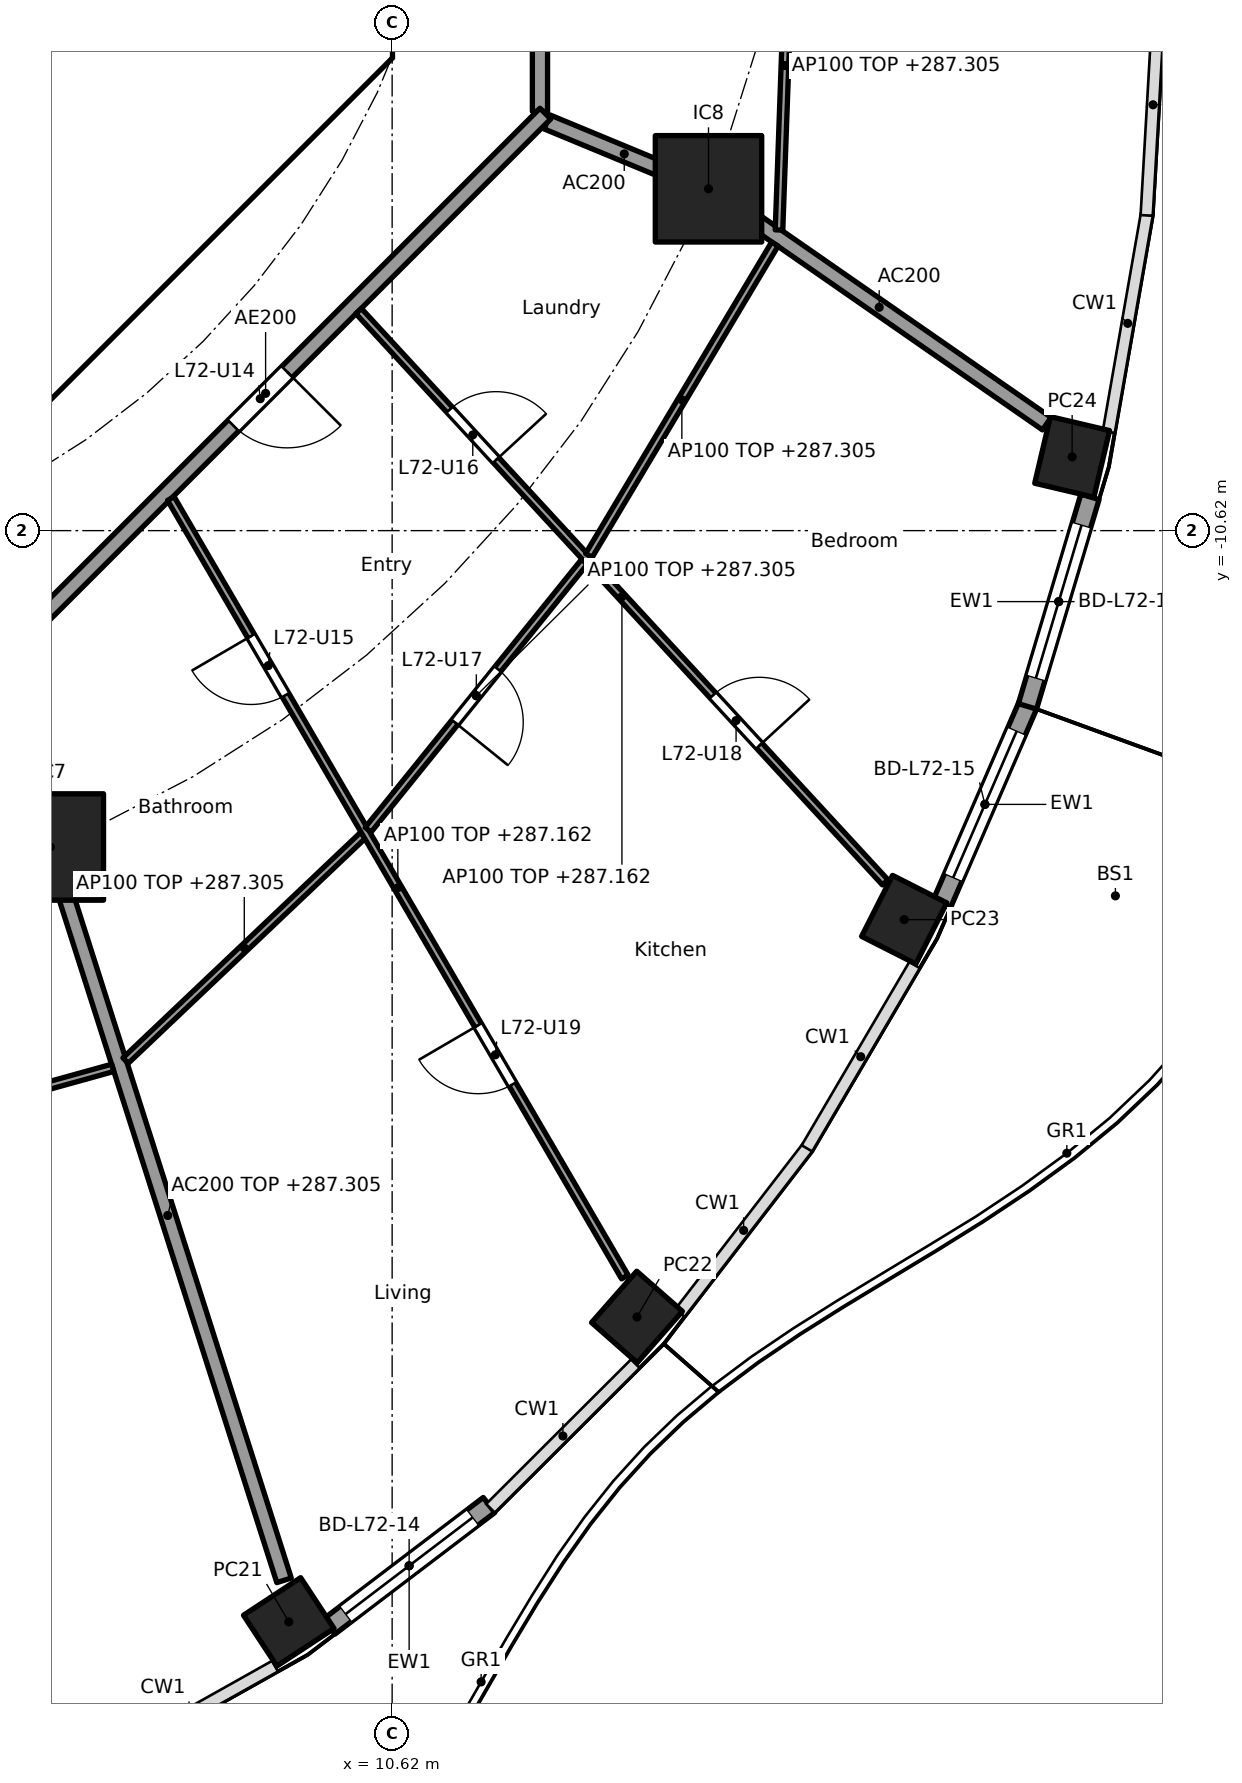
"""IFC4 building model, lengths in metres.
Left out: names, types, materials, properties, quantities, classifications, styles, units other than length and angle.
Written with IfcOpenShell. Run it as: python <this file> out.ifc"""

import sys

from ifc_helpers import new_model, si_unit, direction, frame, frame_2d, origin, origin_2d, place, context, subcontext, project, spatial, polyline, rectangle, hollow_rectangle, outline, extrude, element, fill, save


model = new_model("IFC4")
c1 = context("Model", 3, precision=1e-05, world=origin(), true_north=direction((0.0, 1.0)))
c2 = subcontext(c1, "Body", "Model", "MODEL_VIEW")
j1 = project(units=[si_unit("LENGTHUNIT", "METRE"), si_unit("PLANEANGLEUNIT", "RADIAN")], contexts=[c1])
p1 = place(None, origin())
s1 = spatial("IfcSite", under=j1, at=p1, CompositionType="ELEMENT")
p2 = place(p1, origin())
s2 = spatial("IfcBuilding", under=s1, at=p2, CompositionType="ELEMENT")
p3 = place(p2, frame((0.0, 0.0, 284.4)))
s3 = spatial("IfcBuildingStorey", under=s2, at=p3, CompositionType="ELEMENT", Elevation=284.4)
for number, where, z_axis, x_axis in (
    (1, (9.26, -24.976, 0.0), (0.0, 0.0, 1.0), (0.836, 0.549, 0.0)),
    (2, (13.841, -20.965, 0.0), (0.0, 0.0, 1.0), (0.66, 0.751, 0.0)),
    (3, (17.356, -15.738, 0.0), (0.0, 0.0, 1.0), (0.452, 0.892, 0.0)),
    (4, (19.566, -9.65, 0.0), (0.0, 0.0, 1.0), (0.229, 0.973, 0.0)),
):
    element("IfcColumn", number, at=place(p3, frame(where, z_axis=z_axis, x_axis=x_axis)), inside=s3, PredefinedType="COLUMN", context=c2, shape_type="SweptSolid", body=[
        extrude(hollow_rectangle(XDim=0.9, YDim=0.8, WallThickness=0.028, at=origin_2d()), origin(), (0.0, 0.0, 1.0), 3.7),
    ])
for number, where, z_axis, x_axis in (
    (5, (6.123, -14.782, 0.0), (0.0, 0.0, 1.0), (1.0, 0.0, 0.0)),
    (6, (14.782, -6.123, 0.0), (0.0, 0.0, 1.0), (1.0, 0.0, 0.0)),
):
    element("IfcColumn", number, at=place(p3, frame(where, z_axis=z_axis, x_axis=x_axis)), inside=s3, PredefinedType="COLUMN", context=c2, shape_type="SweptSolid", body=[
        extrude(rectangle(XDim=1.4, YDim=1.4, at=origin_2d()), origin(), (0.0, 0.0, 1.0), 3.7),
    ])
p4 = place(p3, frame((11.895, -23.439, 0.0), z_axis=(0.0, 0.0, 1.0), x_axis=(-0.796055284084, -0.605223912847, 0.0)))
e7 = element("IfcWall", 7, at=p4, inside=s3, PredefinedType="SOLIDWALL", context=c2, shape_type="SweptSolid", body=[
    extrude(rectangle(XDim=2.641, YDim=0.25, at=frame_2d((1.32, 0.0))), origin(), (0.0, 0.0, 1.0), 3.44),
])
p5 = place(p4, frame((0.27, 0.0, 0.0)))
e8 = element("IfcOpeningElement", 8, at=p5, cuts=e7, PredefinedType="OPENING", context=c2, shape_type="SweptSolid", body=[
    extrude(rectangle(XDim=2.1, YDim=2.4, at=frame_2d((1.05, 1.2))), frame((0.0, 0.135, 0.0), z_axis=(0.0, -1.0, 0.0), x_axis=(1.0, 0.0, 0.0)), (0.0, 0.0, 1.0), 0.27),
])
p6 = place(p3, frame((18.983, -12.918, 0.0), z_axis=(0.0, 0.0, 1.0), x_axis=(-0.397597791596, -0.9175598052, 0.0)))
e9 = element("IfcWall", 9, at=p6, inside=s3, PredefinedType="SOLIDWALL", context=c2, shape_type="SweptSolid", body=[
    extrude(rectangle(XDim=2.841, YDim=0.25, at=frame_2d((1.42, 0.0))), origin(), (0.0, 0.0, 1.0), 3.44),
])
p7 = place(p6, frame((0.371, 0.0, 0.0)))
e10 = element("IfcOpeningElement", 10, at=p7, cuts=e9, PredefinedType="OPENING", context=c2, shape_type="SweptSolid", body=[
    extrude(rectangle(XDim=2.1, YDim=2.4, at=frame_2d((1.05, 1.2))), frame((0.0, 0.135, 0.0), z_axis=(0.0, -1.0, 0.0), x_axis=(1.0, 0.0, 0.0)), (0.0, 0.0, 1.0), 0.27),
])
p8 = place(p3, frame((19.801, -10.175, 0.0), z_axis=(0.0, 0.0, 1.0), x_axis=(-0.285899456462, -0.958259620768, 0.0)))
e11 = element("IfcWall", 11, at=p8, inside=s3, PredefinedType="SOLIDWALL", context=c2, shape_type="SweptSolid", body=[
    extrude(rectangle(XDim=2.877, YDim=0.25, at=frame_2d((1.438, 0.0))), origin(), (0.0, 0.0, 1.0), 3.44),
])
p9 = place(p8, frame((0.389, 0.0, 0.0)))
e12 = element("IfcOpeningElement", 12, at=p9, cuts=e11, PredefinedType="OPENING", context=c2, shape_type="SweptSolid", body=[
    extrude(rectangle(XDim=2.1, YDim=2.4, at=frame_2d((1.05, 1.2))), frame((0.0, 0.135, 0.0), z_axis=(0.0, -1.0, 0.0), x_axis=(1.0, 0.0, 0.0)), (0.0, 0.0, 1.0), 0.27),
])
p10 = place(p3, frame((4.613, -9.988, 0.0), z_axis=(0.0, 0.0, 1.0), x_axis=(0.707106781187, 0.707106781187, 0.0)))
e13 = element("IfcWall", 13, at=p10, inside=s3, PredefinedType="SHEAR", context=c2, shape_type="SweptSolid", body=[
    extrude(rectangle(XDim=7.602, YDim=0.6, at=frame_2d((3.801, 0.0))), origin(), (0.0, 0.0, 1.0), 3.44),
])
p11 = place(p10, frame((3.201, 0.0, 0.0)))
e14 = element("IfcOpeningElement", 14, at=p11, cuts=e13, PredefinedType="OPENING", context=c2, shape_type="SweptSolid", body=[
    extrude(rectangle(XDim=1.2, YDim=2.1, at=frame_2d((0.6, 1.05))), frame((0.0, 0.31, 0.0), z_axis=(0.0, -1.0, 0.0), x_axis=(1.0, 0.0, 0.0)), (0.0, 0.0, 1.0), 0.62),
])
p12 = place(p3, origin())
e15 = element("IfcWall", 15, at=p12, inside=s3, PredefinedType="SHEAR", context=c2, shape_type="SweptSolid", body=[
    extrude(outline(polyline([(9.776, -4.401), (10.025, -4.152), (10.025, -3.801), (10.025, 4.152), (9.776, 4.401), (10.2, 4.825), (10.625, 4.401), (10.625, -4.401), (10.2, -4.825), (9.776, -4.401)])), origin(), (0.0, 0.0, 1.0), 3.44),
])
p13 = place(p3, frame((5.243, -12.657, 0.0), z_axis=(0.0, 0.0, 1.0), x_axis=(0.382707856524, -0.923869415315, 0.0)))
e16 = element("IfcWall", 16, at=p13, inside=s3, PredefinedType="PARTITIONING", context=c2, shape_type="SweptSolid", body=[
    extrude(rectangle(XDim=2.2, YDim=0.2, at=frame_2d((1.1, 0.0))), origin(), (0.0, 0.0, 1.0), 3.44),
])
p14 = place(p3, frame((6.138, -14.83, 0.0), z_axis=(0.0, 0.0, 1.0), x_axis=(0.303653679037, -0.952782474234, 0.0)))
e17 = element("IfcWall", 17, at=p14, inside=s3, PredefinedType="PARTITIONING", context=c2, shape_type="SweptSolid", body=[
    extrude(rectangle(XDim=10.076, YDim=0.2, at=frame_2d((5.038, 0.0))), origin(), (0.0, 0.0, 1.0), 2.905),
])
p15 = place(p3, frame((12.657, -5.243, 0.0), z_axis=(0.0, 0.0, 1.0), x_axis=(0.92383017907, -0.382802560388, 0.0)))
e18 = element("IfcWall", 18, at=p15, inside=s3, PredefinedType="PARTITIONING", context=c2, shape_type="SweptSolid", body=[
    extrude(rectangle(XDim=2.2, YDim=0.2, at=frame_2d((1.1, 0.0))), origin(), (0.0, 0.0, 1.0), 3.44),
])
p16 = place(p3, frame((14.823, -6.151, 0.0), z_axis=(0.0, 0.0, 1.0), x_axis=(0.821435065081, -0.570302054928, 0.0)))
e19 = element("IfcWall", 19, at=p16, inside=s3, PredefinedType="PARTITIONING", context=c2, shape_type="SweptSolid", body=[
    extrude(rectangle(XDim=5.368, YDim=0.2, at=frame_2d((2.684, 0.0))), origin(), (0.0, 0.0, 1.0), 3.44),
])
p17 = place(p3, frame((12.565, -5.104, 0.0), z_axis=(0.0, 0.0, 1.0), x_axis=(0.0, 1.0, 0.0)))
e20 = element("IfcWall", 20, at=p17, inside=s3, PredefinedType="PARTITIONING", context=c2, shape_type="SweptSolid", body=[
    extrude(rectangle(XDim=10.209, YDim=0.2, at=frame_2d((5.104, 0.0))), origin(), (0.0, 0.0, 1.0), 3.44),
])
p18 = place(p17, frame((4.604, 0.0, 0.0)))
e21 = element("IfcOpeningElement", 21, at=p18, cuts=e20, PredefinedType="OPENING", context=c2, shape_type="SweptSolid", body=[
    extrude(rectangle(XDim=1.0, YDim=2.1, at=frame_2d((0.5, 1.05))), frame((0.0, 0.11, 0.0), z_axis=(0.0, -1.0, 0.0), x_axis=(1.0, 0.0, 0.0)), (0.0, 0.0, 1.0), 0.22),
])
p19 = place(p3, frame((5.275, -12.494, 0.0), z_axis=(0.0, 0.0, 1.0), x_axis=(0.707106781187, 0.707106781187, 0.0)))
e22 = element("IfcWall", 22, at=p19, inside=s3, PredefinedType="PARTITIONING", context=c2, shape_type="SweptSolid", body=[
    extrude(rectangle(XDim=10.409, YDim=0.2, at=frame_2d((5.205, 0.0))), origin(), (0.0, 0.0, 1.0), 3.44),
])
p20 = place(p19, frame((4.604, 0.0, 0.0)))
e23 = element("IfcOpeningElement", 23, at=p20, cuts=e22, PredefinedType="OPENING", context=c2, shape_type="SweptSolid", body=[
    extrude(rectangle(XDim=1.0, YDim=2.1, at=frame_2d((0.5, 1.05))), frame((0.0, 0.11, 0.0), z_axis=(0.0, -1.0, 0.0), x_axis=(1.0, 0.0, 0.0)), (0.0, 0.0, 1.0), 0.22),
])
p21 = place(p3, frame((15.865, -2.338, 0.0), z_axis=(0.0, 0.0, 1.0), x_axis=(-0.035864509465, -0.999356661538, 0.0)))
e24 = element("IfcWall", 24, at=p21, inside=s3, PredefinedType="PARTITIONING", context=c2, shape_type="SweptSolid", body=[
    extrude(rectangle(XDim=4.329, YDim=0.1, at=frame_2d((2.165, 0.0))), origin(), (0.0, 0.0, 1.0), 2.905),
])
p22 = place(p3, frame((3.231, -18.718, 0.0), z_axis=(0.0, 0.0, 1.0), x_axis=(0.963606817151, 0.267323590318, 0.0)))
e25 = element("IfcWall", 25, at=p22, inside=s3, PredefinedType="PARTITIONING", context=c2, shape_type="SweptSolid", body=[
    extrude(rectangle(XDim=3.853, YDim=0.1, at=frame_2d((1.927, 0.0))), origin(), (0.0, 0.0, 1.0), 2.905),
])
p23 = place(p22, frame((1.477, 0.0, 0.0)))
e26 = element("IfcOpeningElement", 26, at=p23, cuts=e25, PredefinedType="OPENING", context=c2, shape_type="SweptSolid", body=[
    extrude(rectangle(XDim=0.9, YDim=2.1, at=frame_2d((0.45, 1.05))), frame((0.0, 0.06, 0.0), z_axis=(0.0, -1.0, 0.0), x_axis=(1.0, 0.0, 0.0)), (0.0, 0.0, 1.0), 0.12),
])
p24 = place(p3, frame((7.113, -17.592, 0.0), z_axis=(0.0, 0.0, 1.0), x_axis=(0.725433932329, 0.688291805723, 0.0)))
e27 = element("IfcWall", 27, at=p24, inside=s3, PredefinedType="PARTITIONING", context=c2, shape_type="SweptSolid", body=[
    extrude(rectangle(XDim=4.305, YDim=0.1, at=frame_2d((2.153, 0.0))), origin(), (0.0, 0.0, 1.0), 2.905),
])
p25 = place(p3, frame((7.708, -10.198, 0.0), z_axis=(0.0, 0.0, 1.0), x_axis=(0.503839015963, -0.863797572347, 0.0)))
e28 = element("IfcWall", 28, at=p25, inside=s3, PredefinedType="PARTITIONING", context=c2, shape_type="SweptSolid", body=[
    extrude(rectangle(XDim=11.856, YDim=0.1, at=frame_2d((5.928, 0.0))), origin(), (0.0, 0.0, 1.0), 2.762),
])
p26 = place(p25, frame((2.095, 0.0, 0.0)))
e29 = element("IfcOpeningElement", 29, at=p26, cuts=e28, PredefinedType="OPENING", context=c2, shape_type="SweptSolid", body=[
    extrude(rectangle(XDim=0.9, YDim=2.1, at=frame_2d((0.45, 1.05))), frame((0.0, 0.06, 0.0), z_axis=(0.0, -1.0, 0.0), x_axis=(1.0, 0.0, 0.0)), (0.0, 0.0, 1.0), 0.12),
])
p27 = place(p25, frame((8.023, 0.0, 0.0)))
e30 = element("IfcOpeningElement", 30, at=p27, cuts=e28, PredefinedType="OPENING", context=c2, shape_type="SweptSolid", body=[
    extrude(rectangle(XDim=0.9, YDim=2.1, at=frame_2d((0.45, 1.05))), frame((0.0, 0.06, 0.0), z_axis=(0.0, -1.0, 0.0), x_axis=(1.0, 0.0, 0.0)), (0.0, 0.0, 1.0), 0.12),
])
p28 = place(p3, frame((10.304, -14.555, 0.0), z_axis=(0.0, 0.0, 1.0), x_axis=(0.628170338674, 0.778075848237, 0.0)))
e31 = element("IfcWall", 31, at=p28, inside=s3, PredefinedType="PARTITIONING", context=c2, shape_type="SweptSolid", body=[
    extrude(rectangle(XDim=4.532, YDim=0.1, at=frame_2d((2.266, 0.0))), origin(), (0.0, 0.0, 1.0), 2.905),
])
p29 = place(p28, frame((1.816, 0.0, 0.0)))
e32 = element("IfcOpeningElement", 32, at=p29, cuts=e31, PredefinedType="OPENING", context=c2, shape_type="SweptSolid", body=[
    extrude(rectangle(XDim=0.9, YDim=2.1, at=frame_2d((0.45, 1.05))), frame((0.0, 0.06, 0.0), z_axis=(0.0, -1.0, 0.0), x_axis=(1.0, 0.0, 0.0)), (0.0, 0.0, 1.0), 0.12),
])
p30 = place(p3, frame((10.179, -7.731, 0.0), z_axis=(0.0, 0.0, 1.0), x_axis=(0.67775318564, -0.73528947997, 0.0)))
e33 = element("IfcWall", 33, at=p30, inside=s3, PredefinedType="PARTITIONING", context=c2, shape_type="SweptSolid", body=[
    extrude(rectangle(XDim=10.222, YDim=0.1, at=frame_2d((5.111, 0.0))), origin(), (0.0, 0.0, 1.0), 2.762),
])
p31 = place(p30, frame((1.766, 0.0, 0.0)))
e34 = element("IfcOpeningElement", 34, at=p31, cuts=e33, PredefinedType="OPENING", context=c2, shape_type="SweptSolid", body=[
    extrude(rectangle(XDim=0.9, YDim=2.1, at=frame_2d((0.45, 1.05))), frame((0.0, 0.06, 0.0), z_axis=(0.0, -1.0, 0.0), x_axis=(1.0, 0.0, 0.0)), (0.0, 0.0, 1.0), 0.12),
])
p32 = place(p30, frame((6.877, 0.0, 0.0)))
e35 = element("IfcOpeningElement", 35, at=p32, cuts=e33, PredefinedType="OPENING", context=c2, shape_type="SweptSolid", body=[
    extrude(rectangle(XDim=0.9, YDim=2.1, at=frame_2d((0.45, 1.05))), frame((0.0, 0.06, 0.0), z_axis=(0.0, -1.0, 0.0), x_axis=(1.0, 0.0, 0.0)), (0.0, 0.0, 1.0), 0.12),
])
p33 = place(p3, frame((13.208, -10.947, 0.0), z_axis=(0.0, 0.0, 1.0), x_axis=(0.512726452516, 0.858552028063, 0.0)))
e36 = element("IfcWall", 36, at=p33, inside=s3, PredefinedType="PARTITIONING", context=c2, shape_type="SweptSolid", body=[
    extrude(rectangle(XDim=4.772, YDim=0.1, at=frame_2d((2.386, 0.0))), origin(), (0.0, 0.0, 1.0), 2.905),
])
p34 = place(p5, origin())
e37 = element("IfcDoor", 37, at=p34, inside=s3, OperationType="SLIDING_TO_LEFT", PredefinedType="DOOR", context=c2, shape_type="SweptSolid", body=[
    extrude(rectangle(XDim=2.1, YDim=2.4, at=frame_2d((1.05, 1.2))), frame((0.0, 0.025, 0.0), z_axis=(0.0, -1.0, 0.0), x_axis=(1.0, 0.0, 0.0)), (0.0, 0.0, 1.0), 0.05),
])
fill(e8, e37)
p35 = place(p7, origin())
e38 = element("IfcDoor", 38, at=p35, inside=s3, OperationType="SLIDING_TO_LEFT", PredefinedType="DOOR", context=c2, shape_type="SweptSolid", body=[
    extrude(rectangle(XDim=2.1, YDim=2.4, at=frame_2d((1.05, 1.2))), frame((0.0, 0.025, 0.0), z_axis=(0.0, -1.0, 0.0), x_axis=(1.0, 0.0, 0.0)), (0.0, 0.0, 1.0), 0.05),
])
fill(e10, e38)
p36 = place(p9, origin())
e39 = element("IfcDoor", 39, at=p36, inside=s3, OperationType="SLIDING_TO_LEFT", PredefinedType="DOOR", context=c2, shape_type="SweptSolid", body=[
    extrude(rectangle(XDim=2.1, YDim=2.4, at=frame_2d((1.05, 1.2))), frame((0.0, 0.025, 0.0), z_axis=(0.0, -1.0, 0.0), x_axis=(1.0, 0.0, 0.0)), (0.0, 0.0, 1.0), 0.05),
])
fill(e12, e39)
p37 = place(p11, origin())
e40 = element("IfcDoor", 40, at=p37, inside=s3, OperationType="SINGLE_SWING_LEFT", PredefinedType="DOOR", context=c2, shape_type="SweptSolid", body=[
    extrude(rectangle(XDim=1.2, YDim=2.1, at=frame_2d((0.6, 1.05))), frame((0.0, 0.025, 0.0), z_axis=(0.0, -1.0, 0.0), x_axis=(1.0, 0.0, 0.0)), (0.0, 0.0, 1.0), 0.05),
])
fill(e14, e40)
p38 = place(p20, frame((1.0, 0.0, 0.0), x_axis=(-1.0, 0.0, 0.0)))
e41 = element("IfcDoor", 41, at=p38, inside=s3, OperationType="SINGLE_SWING_LEFT", PredefinedType="DOOR", context=c2, shape_type="SweptSolid", body=[
    extrude(rectangle(XDim=1.0, YDim=2.1, at=frame_2d((0.5, 1.05))), frame((0.0, 0.025, 0.0), z_axis=(0.0, -1.0, 0.0), x_axis=(1.0, 0.0, 0.0)), (0.0, 0.0, 1.0), 0.05),
])
fill(e23, e41)
p39 = place(p26, frame((0.9, 0.0, 0.0), x_axis=(-1.0, 0.0, 0.0)))
e42 = element("IfcDoor", 42, at=p39, inside=s3, OperationType="SINGLE_SWING_RIGHT", PredefinedType="DOOR", context=c2, shape_type="SweptSolid", body=[
    extrude(rectangle(XDim=0.9, YDim=2.1, at=frame_2d((0.45, 1.05))), frame((0.0, 0.025, 0.0), z_axis=(0.0, -1.0, 0.0), x_axis=(1.0, 0.0, 0.0)), (0.0, 0.0, 1.0), 0.05),
])
fill(e29, e42)
p40 = place(p31, origin())
e43 = element("IfcDoor", 43, at=p40, inside=s3, OperationType="SINGLE_SWING_RIGHT", PredefinedType="DOOR", context=c2, shape_type="SweptSolid", body=[
    extrude(rectangle(XDim=0.9, YDim=2.1, at=frame_2d((0.45, 1.05))), frame((0.0, 0.025, 0.0), z_axis=(0.0, -1.0, 0.0), x_axis=(1.0, 0.0, 0.0)), (0.0, 0.0, 1.0), 0.05),
])
fill(e34, e43)
p41 = place(p29, frame((0.9, 0.0, 0.0), x_axis=(-1.0, 0.0, 0.0)))
e44 = element("IfcDoor", 44, at=p41, inside=s3, OperationType="SINGLE_SWING_RIGHT", PredefinedType="DOOR", context=c2, shape_type="SweptSolid", body=[
    extrude(rectangle(XDim=0.9, YDim=2.1, at=frame_2d((0.45, 1.05))), frame((0.0, 0.025, 0.0), z_axis=(0.0, -1.0, 0.0), x_axis=(1.0, 0.0, 0.0)), (0.0, 0.0, 1.0), 0.05),
])
fill(e32, e44)
p42 = place(p32, origin())
e45 = element("IfcDoor", 45, at=p42, inside=s3, OperationType="SINGLE_SWING_RIGHT", PredefinedType="DOOR", context=c2, shape_type="SweptSolid", body=[
    extrude(rectangle(XDim=0.9, YDim=2.1, at=frame_2d((0.45, 1.05))), frame((0.0, 0.025, 0.0), z_axis=(0.0, -1.0, 0.0), x_axis=(1.0, 0.0, 0.0)), (0.0, 0.0, 1.0), 0.05),
])
fill(e35, e45)
p43 = place(p27, frame((0.9, 0.0, 0.0), x_axis=(-1.0, 0.0, 0.0)))
e46 = element("IfcDoor", 46, at=p43, inside=s3, OperationType="SINGLE_SWING_RIGHT", PredefinedType="DOOR", context=c2, shape_type="SweptSolid", body=[
    extrude(rectangle(XDim=0.9, YDim=2.1, at=frame_2d((0.45, 1.05))), frame((0.0, 0.025, 0.0), z_axis=(0.0, -1.0, 0.0), x_axis=(1.0, 0.0, 0.0)), (0.0, 0.0, 1.0), 0.05),
])
fill(e30, e46)
save(model, sys.argv[1])
